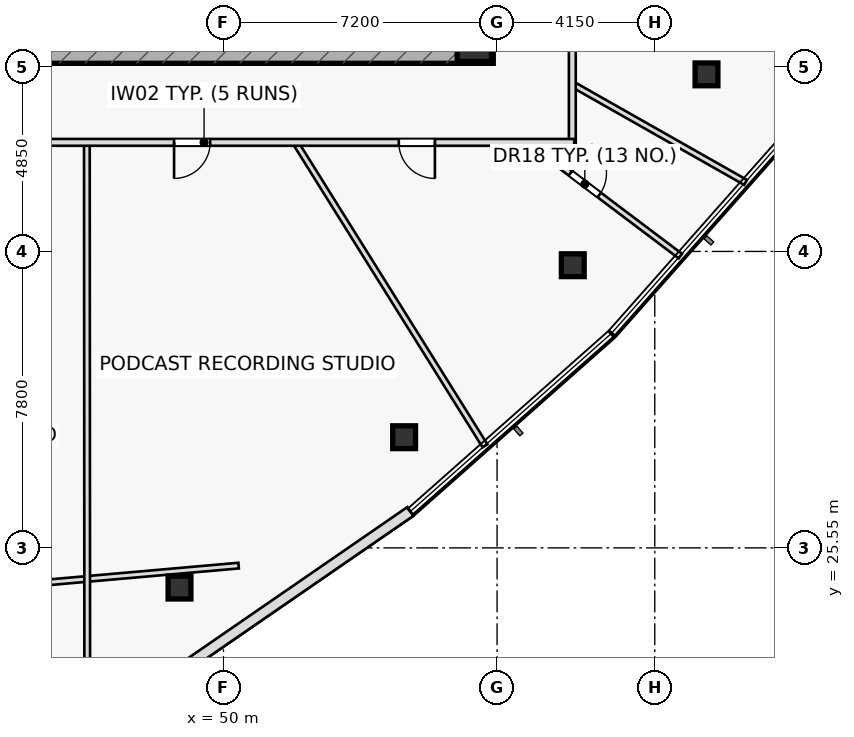
"""IFC4 building model, lengths in metres.
Left out: names, types, materials, properties, quantities, classifications, styles, units other than length and angle.
Written with IfcOpenShell. Run it as: python <this file> out.ifc"""

import sys

from ifc_helpers import new_model, si_unit, direction, frame, frame_2d, origin, origin_2d, place, context, subcontext, project, spatial, rectangle, hollow_rectangle, extrude, element, fill, save


model = new_model("IFC4")
c1 = context("Model", 3, precision=1e-05, world=origin(), true_north=direction((0.0, 1.0)))
c2 = subcontext(c1, "Body", "Model", "MODEL_VIEW")
j1 = project(units=[si_unit("LENGTHUNIT", "METRE"), si_unit("PLANEANGLEUNIT", "RADIAN")], contexts=[c1])
p1 = place(None, origin())
s1 = spatial("IfcSite", under=j1, at=p1, CompositionType="ELEMENT")
p2 = place(p1, origin())
s2 = spatial("IfcBuilding", under=s1, at=p2, CompositionType="ELEMENT")
p3 = place(p2, frame((0.0, 0.0, 230.05)))
s3 = spatial("IfcBuildingStorey", under=s2, at=p3, CompositionType="ELEMENT", Elevation=230.05)
p4 = place(p3, frame((42.9, 38.55, 0.0), z_axis=(0.0, 0.0, 1.0), x_axis=(1.0, 0.0, 0.0)))
e1 = element("IfcWall", 1, at=p4, inside=s3, PredefinedType="SHEAR", context=c2, shape_type="SweptSolid", body=[
    extrude(rectangle(XDim=14.2, YDim=0.5, at=frame_2d((7.1, 0.0))), origin(), (0.0, 0.0, 1.0), 3.65),
])
p5 = place(p4, frame((0.78, 0.0, 0.0)))
e2 = element("IfcOpeningElement", 2, at=p5, cuts=e1, PredefinedType="OPENING", context=c2, shape_type="SweptSolid", body=[
    extrude(rectangle(XDim=1.05, YDim=2.2, at=frame_2d((0.525, 1.1))), frame((0.0, 0.26, 0.0), z_axis=(0.0, -1.0, 0.0), x_axis=(1.0, 0.0, 0.0)), (0.0, 0.0, 1.0), 0.52),
])
p6 = place(p3, frame((56.6, 38.8, 0.0), z_axis=(0.0, 0.0, 1.0), x_axis=(1.0, 0.0, 0.0)))
e3 = element("IfcColumn", 3, at=p6, inside=s3, PredefinedType="COLUMN", context=c2, shape_type="SweptSolid", body=[
    extrude(rectangle(XDim=0.9, YDim=0.9, at=origin_2d()), origin(), (0.0, 0.0, 1.0), 3.65),
])
for number, where, z_axis, x_axis in (
    (4, (48.844, 24.505, 0.0), (0.0, 0.0, 1.0), (1.0, 0.0, 0.0)),
    (5, (54.754, 28.462, 0.0), (0.0, 0.0, 1.0), (1.0, 0.0, 0.0)),
    (6, (59.192, 32.987, 0.0), (0.0, 0.0, 1.0), (1.0, 0.0, 0.0)),
    (7, (62.711, 38.009, 0.0), (0.0, 0.0, 1.0), (1.0, 0.0, 0.0)),
):
    element("IfcColumn", number, at=place(p3, frame(where, z_axis=z_axis, x_axis=x_axis)), inside=s3, PredefinedType="COLUMN", context=c2, shape_type="SweptSolid", body=[
        extrude(hollow_rectangle(XDim=0.6, YDim=0.6, WallThickness=0.036, at=origin_2d()), origin(), (0.0, 0.0, 1.0), 3.65),
    ])
p7 = place(p3, frame((39.808, 24.152, 0.0), z_axis=(0.0, 0.0, 1.0), x_axis=(0.996153584085, 0.087624408208, 0.0)))
e8 = element("IfcWall", 8, at=p7, inside=s3, PredefinedType="PARTITIONING", context=c2, shape_type="SweptSolid", body=[
    extrude(rectangle(XDim=10.632, YDim=0.15, at=frame_2d((5.316, 0.0))), origin(), (0.0, 0.0, 1.0), 3.135),
])
p8 = place(p3, frame((58.052, 36.22, 0.0), z_axis=(0.0, 0.0, 1.0), x_axis=(0.798637013942, -0.601813027411, 0.0)))
e9 = element("IfcWall", 9, at=p8, inside=s3, PredefinedType="PARTITIONING", context=c2, shape_type="SweptSolid", body=[
    extrude(rectangle(XDim=4.973, YDim=0.15, at=frame_2d((2.486, 0.0))), origin(), (0.0, 0.0, 1.0), 3.135),
])
p9 = place(p8, frame((1.35, 0.0, 0.0)))
e10 = element("IfcOpeningElement", 10, at=p9, cuts=e9, PredefinedType="OPENING", context=c2, shape_type="SweptSolid", body=[
    extrude(rectangle(XDim=0.95, YDim=2.05, at=frame_2d((0.475, 1.025))), frame((0.0, 0.085, 0.0), z_axis=(0.0, -1.0, 0.0), x_axis=(1.0, 0.0, 0.0)), (0.0, 0.0, 1.0), 0.17),
])
p10 = place(p3, frame((59.18, 37.752, 0.0), z_axis=(0.0, 0.0, 1.0), x_axis=(0.869846344998, -0.493322750432, 0.0)))
e11 = element("IfcWall", 11, at=p10, inside=s3, PredefinedType="PARTITIONING", context=c2, shape_type="SweptSolid", body=[
    extrude(rectangle(XDim=5.242, YDim=0.15, at=frame_2d((2.621, 0.0))), origin(), (0.0, 0.0, 1.0), 3.135),
])
p11 = place(p3, frame((46.406, 36.22, 0.0), z_axis=(0.0, 0.0, 1.0), x_axis=(0.000693481109, -0.999999759542, 0.0)))
e12 = element("IfcWall", 12, at=p11, inside=s3, PredefinedType="PARTITIONING", context=c2, shape_type="SweptSolid", body=[
    extrude(rectangle(XDim=15.138, YDim=0.15, at=frame_2d((7.569, 0.0))), origin(), (0.0, 0.0, 1.0), 3.025),
])
p12 = place(p3, frame((51.89, 36.22, 0.0), z_axis=(0.0, 0.0, 1.0), x_axis=(0.530145730437, -0.847906542314, 0.0)))
e13 = element("IfcWall", 13, at=p12, inside=s3, PredefinedType="PARTITIONING", context=c2, shape_type="SweptSolid", body=[
    extrude(rectangle(XDim=9.418, YDim=0.15, at=frame_2d((4.709, 0.0))), origin(), (0.0, 0.0, 1.0), 3.025),
])
p13 = place(p3, frame((59.18, 41.1, 0.0), z_axis=(0.0, 0.0, 1.0), x_axis=(0.0, -1.0, 0.0)))
e14 = element("IfcWall", 14, at=p13, inside=s3, PredefinedType="PARTITIONING", context=c2, shape_type="SweptSolid", body=[
    extrude(rectangle(XDim=4.93, YDim=0.18, at=frame_2d((2.465, 0.0))), origin(), (0.0, 0.0, 1.0), 3.325),
])
p14 = place(p13, frame((1.342, 0.0, 0.0)))
e15 = element("IfcOpeningElement", 15, at=p14, cuts=e14, PredefinedType="OPENING", context=c2, shape_type="SweptSolid", body=[
    extrude(rectangle(XDim=0.95, YDim=2.05, at=frame_2d((0.475, 1.025))), frame((0.0, 0.1, 0.0), z_axis=(0.0, -1.0, 0.0), x_axis=(1.0, 0.0, 0.0)), (0.0, 0.0, 1.0), 0.2),
])
p15 = place(p3, frame((59.23, 36.22, 0.0), z_axis=(0.0, 0.0, 1.0), x_axis=(-1.0, 0.0, 0.0)))
e16 = element("IfcWall", 16, at=p15, inside=s3, PredefinedType="PARTITIONING", context=c2, shape_type="SweptSolid", body=[
    extrude(rectangle(XDim=19.48, YDim=0.18, at=frame_2d((9.74, 0.0))), origin(), (0.0, 0.0, 1.0), 3.025),
])
p16 = place(p15, frame((3.666, 0.0, 0.0)))
e17 = element("IfcOpeningElement", 17, at=p16, cuts=e16, PredefinedType="OPENING", context=c2, shape_type="SweptSolid", body=[
    extrude(rectangle(XDim=0.95, YDim=2.05, at=frame_2d((0.475, 1.025))), frame((0.0, 0.1, 0.0), z_axis=(0.0, -1.0, 0.0), x_axis=(1.0, 0.0, 0.0)), (0.0, 0.0, 1.0), 0.2),
])
p17 = place(p15, frame((9.579, 0.0, 0.0)))
e18 = element("IfcOpeningElement", 18, at=p17, cuts=e16, PredefinedType="OPENING", context=c2, shape_type="SweptSolid", body=[
    extrude(rectangle(XDim=0.95, YDim=2.05, at=frame_2d((0.475, 1.025))), frame((0.0, 0.1, 0.0), z_axis=(0.0, -1.0, 0.0), x_axis=(1.0, 0.0, 0.0)), (0.0, 0.0, 1.0), 0.2),
])
p18 = place(p15, frame((14.762, 0.0, 0.0)))
e19 = element("IfcOpeningElement", 19, at=p18, cuts=e16, PredefinedType="OPENING", context=c2, shape_type="SweptSolid", body=[
    extrude(rectangle(XDim=0.95, YDim=2.05, at=frame_2d((0.475, 1.025))), frame((0.0, 0.1, 0.0), z_axis=(0.0, -1.0, 0.0), x_axis=(1.0, 0.0, 0.0)), (0.0, 0.0, 1.0), 0.2),
])
p19 = place(p3, frame((49.084, 22.487, 0.0), z_axis=(0.0, 0.0, 1.0), x_axis=(0.823408162902, 0.567449554821, 0.0)))
e20 = element("IfcWall", 20, at=p19, inside=s3, PredefinedType="STANDARD", context=c2, shape_type="SweptSolid", body=[
    extrude(rectangle(XDim=7.087, YDim=0.28, at=frame_2d((3.543, 0.0))), origin(), (0.0, 0.0, 1.0), 3.65),
])
p20 = place(p9, origin())
e21 = element("IfcDoor", 21, at=p20, inside=s3, OperationType="SINGLE_SWING_LEFT", PredefinedType="DOOR", context=c2, shape_type="SweptSolid", body=[
    extrude(rectangle(XDim=0.95, YDim=2.05, at=frame_2d((0.475, 1.025))), frame((0.0, 0.025, 0.0), z_axis=(0.0, -1.0, 0.0), x_axis=(1.0, 0.0, 0.0)), (0.0, 0.0, 1.0), 0.05),
])
fill(e10, e21)
p21 = place(p16, origin())
e22 = element("IfcDoor", 22, at=p21, inside=s3, OperationType="SINGLE_SWING_LEFT", PredefinedType="DOOR", context=c2, shape_type="SweptSolid", body=[
    extrude(rectangle(XDim=0.95, YDim=2.05, at=frame_2d((0.475, 1.025))), frame((0.0, 0.025, 0.0), z_axis=(0.0, -1.0, 0.0), x_axis=(1.0, 0.0, 0.0)), (0.0, 0.0, 1.0), 0.05),
])
fill(e17, e22)
p22 = place(p17, origin())
e23 = element("IfcDoor", 23, at=p22, inside=s3, OperationType="SINGLE_SWING_RIGHT", PredefinedType="DOOR", context=c2, shape_type="SweptSolid", body=[
    extrude(rectangle(XDim=0.95, YDim=2.05, at=frame_2d((0.475, 1.025))), frame((0.0, 0.025, 0.0), z_axis=(0.0, -1.0, 0.0), x_axis=(1.0, 0.0, 0.0)), (0.0, 0.0, 1.0), 0.05),
])
fill(e18, e23)
save(model, sys.argv[1])
